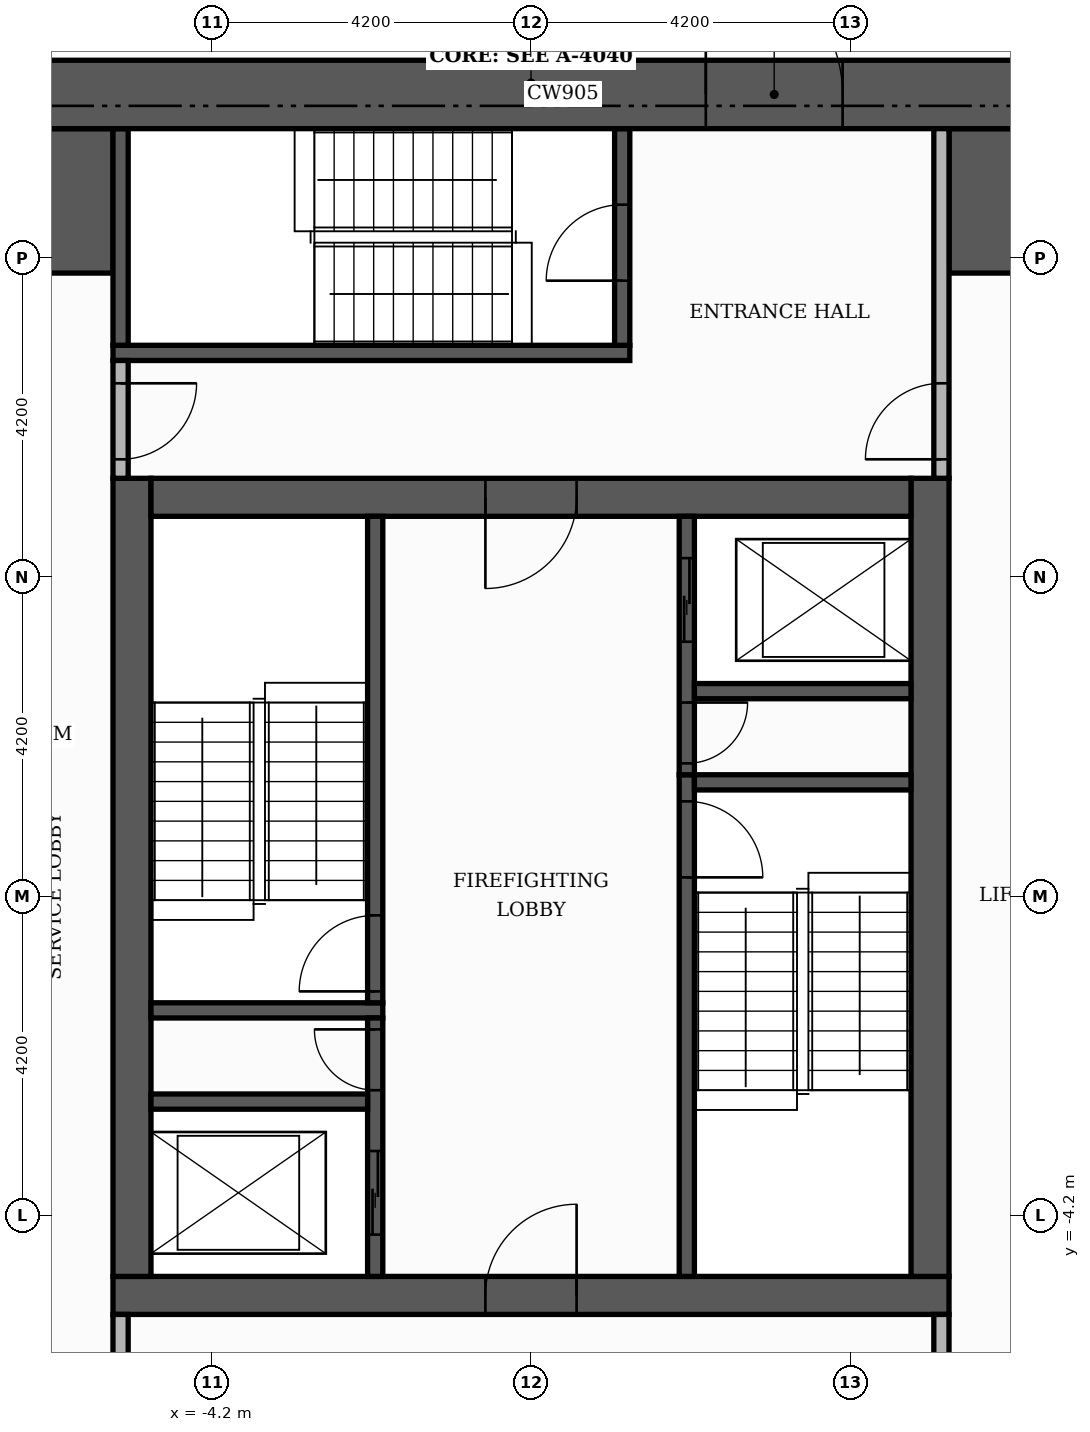
"""IFC4 building model, lengths in metres.
Left out: names, types, materials, properties, quantities, classifications, styles, units other than length and angle.
Written with IfcOpenShell. Run it as: python <this file> out.ifc"""

import sys

from ifc_helpers import new_model, si_unit, direction, frame, frame_2d, origin, place, context, subcontext, project, spatial, rectangle, extrude, element, fill, save


model = new_model("IFC4")
c1 = context("Model", 3, precision=1e-05, world=origin(), true_north=direction((0.0, 1.0)))
c2 = subcontext(c1, "Body", "Model", "MODEL_VIEW")
j1 = project(units=[si_unit("LENGTHUNIT", "METRE"), si_unit("PLANEANGLEUNIT", "RADIAN")], contexts=[c1])
p1 = place(None, origin())
s1 = spatial("IfcSite", under=j1, at=p1, CompositionType="ELEMENT")
p2 = place(p1, origin())
s2 = spatial("IfcBuilding", under=s1, at=p2, CompositionType="ELEMENT")
p3 = place(p2, frame((0.0, 0.0, 240.6)))
s3 = spatial("IfcBuildingStorey", under=s2, at=p3, CompositionType="ELEMENT", Elevation=240.6)
p4 = place(p3, frame((-5.5, -5.25, 0.0), z_axis=(0.0, 0.0, 1.0), x_axis=(1.0, 0.0, 0.0)))
e1 = element("IfcWall", 1, at=p4, inside=s3, PredefinedType="SHEAR", context=c2, shape_type="SweptSolid", body=[
    extrude(rectangle(XDim=11.0, YDim=0.5, at=frame_2d((5.5, 0.0))), origin(), (0.0, 0.0, 1.0), 3.48),
])
p5 = place(p4, frame((4.9, 0.0, 0.0)))
e2 = element("IfcOpeningElement", 2, at=p5, cuts=e1, PredefinedType="OPENING", context=c2, shape_type="SweptSolid", body=[
    extrude(rectangle(XDim=1.2, YDim=2.1, at=frame_2d((0.6, 1.05))), frame((0.0, 0.26, 0.0), z_axis=(0.0, -1.0, 0.0), x_axis=(1.0, 0.0, 0.0)), (0.0, 0.0, 1.0), 0.52),
])
for number, where, z_axis, x_axis in (
    (3, (-5.25, -5.0, 0.0), (0.0, 0.0, 1.0), (0.0, 1.0, 0.0)),
    (4, (5.25, -5.0, 0.0), (0.0, 0.0, 1.0), (0.0, 1.0, 0.0)),
):
    element("IfcWall", number, at=place(p3, frame(where, z_axis=z_axis, x_axis=x_axis)), inside=s3, PredefinedType="SHEAR", context=c2, shape_type="SweptSolid", body=[
        extrude(rectangle(XDim=10.5, YDim=0.5, at=frame_2d((5.25, 0.0))), origin(), (0.0, 0.0, 1.0), 3.48),
    ])
p6 = place(p3, frame((-5.0, 5.25, 0.0), z_axis=(0.0, 0.0, 1.0), x_axis=(1.0, 0.0, 0.0)))
e5 = element("IfcWall", 5, at=p6, inside=s3, PredefinedType="SHEAR", context=c2, shape_type="SweptSolid", body=[
    extrude(rectangle(XDim=10.0, YDim=0.5, at=frame_2d((5.0, 0.0))), origin(), (0.0, 0.0, 1.0), 3.48),
])
p7 = place(p6, frame((4.4, 0.0, 0.0)))
e6 = element("IfcOpeningElement", 6, at=p7, cuts=e5, PredefinedType="OPENING", context=c2, shape_type="SweptSolid", body=[
    extrude(rectangle(XDim=1.2, YDim=2.1, at=frame_2d((0.6, 1.05))), frame((0.0, 0.26, 0.0), z_axis=(0.0, -1.0, 0.0), x_axis=(1.0, 0.0, 0.0)), (0.0, 0.0, 1.0), 0.52),
])
for number, where, z_axis, x_axis in (
    (7, (-10.1, 9.15, 0.0), (0.0, 0.0, 1.0), (1.0, 0.0, 0.0)),
    (8, (5.5, 9.15, 0.0), (0.0, 0.0, 1.0), (1.0, 0.0, 0.0)),
):
    element("IfcWall", number, at=place(p3, frame(where, z_axis=z_axis, x_axis=x_axis)), inside=s3, PredefinedType="SHEAR", context=c2, shape_type="SweptSolid", body=[
        extrude(rectangle(XDim=4.6, YDim=1.9, at=frame_2d((2.3, 0.0))), origin(), (0.0, 0.0, 1.0), 3.48),
    ])
p8 = place(p3, frame((2.05, -5.0, 0.0), z_axis=(0.0, 0.0, 1.0), x_axis=(0.0, 1.0, 0.0)))
e9 = element("IfcWall", 9, at=p8, inside=s3, PredefinedType="SHEAR", context=c2, shape_type="SweptSolid", body=[
    extrude(rectangle(XDim=6.6, YDim=0.2, at=frame_2d((3.3, 0.0))), origin(), (0.0, 0.0, 1.0), 3.48),
])
p9 = place(p8, frame((5.25, 0.0, 0.0)))
e10 = element("IfcOpeningElement", 10, at=p9, cuts=e9, PredefinedType="OPENING", context=c2, shape_type="SweptSolid", body=[
    extrude(rectangle(XDim=1.0, YDim=2.1, at=frame_2d((0.5, 1.05))), frame((0.0, 0.11, 0.0), z_axis=(0.0, -1.0, 0.0), x_axis=(1.0, 0.0, 0.0)), (0.0, 0.0, 1.0), 0.22),
])
p10 = place(p3, frame((-5.0, -1.5, 0.0), z_axis=(0.0, 0.0, 1.0), x_axis=(1.0, 0.0, 0.0)))
e11 = element("IfcWall", 11, at=p10, inside=s3, PredefinedType="SHEAR", context=c2, shape_type="SweptSolid", body=[
    extrude(rectangle(XDim=3.05, YDim=0.2, at=frame_2d((1.525, 0.0))), origin(), (0.0, 0.0, 1.0), 3.48),
])
p11 = place(p3, frame((-2.05, -1.4, 0.0), z_axis=(0.0, 0.0, 1.0), x_axis=(0.0, 1.0, 0.0)))
e12 = element("IfcWall", 12, at=p11, inside=s3, PredefinedType="SHEAR", context=c2, shape_type="SweptSolid", body=[
    extrude(rectangle(XDim=6.4, YDim=0.2, at=frame_2d((3.2, 0.0))), origin(), (0.0, 0.0, 1.0), 3.48),
])
p12 = place(p11, frame((0.15, 0.0, 0.0)))
e13 = element("IfcOpeningElement", 13, at=p12, cuts=e12, PredefinedType="OPENING", context=c2, shape_type="SweptSolid", body=[
    extrude(rectangle(XDim=1.0, YDim=2.1, at=frame_2d((0.5, 1.05))), frame((0.0, 0.11, 0.0), z_axis=(0.0, -1.0, 0.0), x_axis=(1.0, 0.0, 0.0)), (0.0, 0.0, 1.0), 0.22),
])
p13 = place(p3, frame((2.15, 1.5, 0.0), z_axis=(0.0, 0.0, 1.0), x_axis=(1.0, 0.0, 0.0)))
e14 = element("IfcWall", 14, at=p13, inside=s3, PredefinedType="SHEAR", context=c2, shape_type="SweptSolid", body=[
    extrude(rectangle(XDim=2.85, YDim=0.2, at=frame_2d((1.425, 0.0))), origin(), (0.0, 0.0, 1.0), 3.48),
])
p14 = place(p3, frame((-5.5, 7.15, 0.0), z_axis=(0.0, 0.0, 1.0), x_axis=(1.0, 0.0, 0.0)))
e15 = element("IfcWall", 15, at=p14, inside=s3, PredefinedType="SHEAR", context=c2, shape_type="SweptSolid", body=[
    extrude(rectangle(XDim=6.8, YDim=0.2, at=frame_2d((3.4, 0.0))), origin(), (0.0, 0.0, 1.0), 3.48),
])
p15 = place(p3, frame((-5.4, 7.25, 0.0), z_axis=(0.0, 0.0, 1.0), x_axis=(0.0, 1.0, 0.0)))
e16 = element("IfcWall", 16, at=p15, inside=s3, PredefinedType="SHEAR", context=c2, shape_type="SweptSolid", body=[
    extrude(rectangle(XDim=2.85, YDim=0.2, at=frame_2d((1.425, 0.0))), origin(), (0.0, 0.0, 1.0), 3.48),
])
p16 = place(p3, frame((1.2, 7.25, 0.0), z_axis=(0.0, 0.0, 1.0), x_axis=(0.0, 1.0, 0.0)))
e17 = element("IfcWall", 17, at=p16, inside=s3, PredefinedType="SHEAR", context=c2, shape_type="SweptSolid", body=[
    extrude(rectangle(XDim=2.85, YDim=0.2, at=frame_2d((1.425, 0.0))), origin(), (0.0, 0.0, 1.0), 3.48),
])
p17 = place(p16, frame((0.85, 0.0, 0.0)))
e18 = element("IfcOpeningElement", 18, at=p17, cuts=e17, PredefinedType="OPENING", context=c2, shape_type="SweptSolid", body=[
    extrude(rectangle(XDim=1.0, YDim=2.1, at=frame_2d((0.5, 1.05))), frame((0.0, 0.11, 0.0), z_axis=(0.0, -1.0, 0.0), x_axis=(1.0, 0.0, 0.0)), (0.0, 0.0, 1.0), 0.22),
])
p18 = place(p3, frame((-2.05, -5.0, 0.0), z_axis=(0.0, 0.0, 1.0), x_axis=(0.0, 1.0, 0.0)))
e19 = element("IfcWall", 19, at=p18, inside=s3, PredefinedType="SHEAR", context=c2, shape_type="SweptSolid", body=[
    extrude(rectangle(XDim=3.4, YDim=0.2, at=frame_2d((1.7, 0.0))), origin(), (0.0, 0.0, 1.0), 3.48),
])
p19 = place(p18, frame((0.55, 0.0, 0.0)))
e20 = element("IfcOpeningElement", 20, at=p19, cuts=e19, PredefinedType="OPENING", context=c2, shape_type="SweptSolid", body=[
    extrude(rectangle(XDim=1.1, YDim=2.1, at=frame_2d((0.55, 1.05))), frame((0.0, 0.11, 0.0), z_axis=(0.0, -1.0, 0.0), x_axis=(1.0, 0.0, 0.0)), (0.0, 0.0, 1.0), 0.22),
])
p20 = place(p18, frame((2.45, 0.0, 0.0)))
e21 = element("IfcOpeningElement", 21, at=p20, cuts=e19, PredefinedType="OPENING", context=c2, shape_type="SweptSolid", body=[
    extrude(rectangle(XDim=0.8, YDim=2.1, at=frame_2d((0.4, 1.05))), frame((0.0, 0.11, 0.0), z_axis=(0.0, -1.0, 0.0), x_axis=(1.0, 0.0, 0.0)), (0.0, 0.0, 1.0), 0.22),
])
p21 = place(p3, frame((-5.0, -2.7, 0.0), z_axis=(0.0, 0.0, 1.0), x_axis=(1.0, 0.0, 0.0)))
e22 = element("IfcWall", 22, at=p21, inside=s3, PredefinedType="SHEAR", context=c2, shape_type="SweptSolid", body=[
    extrude(rectangle(XDim=2.85, YDim=0.2, at=frame_2d((1.425, 0.0))), origin(), (0.0, 0.0, 1.0), 3.48),
])
p22 = place(p3, frame((2.05, 1.6, 0.0), z_axis=(0.0, 0.0, 1.0), x_axis=(0.0, 1.0, 0.0)))
e23 = element("IfcWall", 23, at=p22, inside=s3, PredefinedType="SHEAR", context=c2, shape_type="SweptSolid", body=[
    extrude(rectangle(XDim=3.4, YDim=0.2, at=frame_2d((1.7, 0.0))), origin(), (0.0, 0.0, 1.0), 3.48),
])
p23 = place(p22, frame((1.75, 0.0, 0.0)))
e24 = element("IfcOpeningElement", 24, at=p23, cuts=e23, PredefinedType="OPENING", context=c2, shape_type="SweptSolid", body=[
    extrude(rectangle(XDim=1.1, YDim=2.1, at=frame_2d((0.55, 1.05))), frame((0.0, 0.11, 0.0), z_axis=(0.0, -1.0, 0.0), x_axis=(1.0, 0.0, 0.0)), (0.0, 0.0, 1.0), 0.22),
])
p24 = place(p22, frame((0.15, 0.0, 0.0)))
e25 = element("IfcOpeningElement", 25, at=p24, cuts=e23, PredefinedType="OPENING", context=c2, shape_type="SweptSolid", body=[
    extrude(rectangle(XDim=0.8, YDim=2.1, at=frame_2d((0.4, 1.05))), frame((0.0, 0.11, 0.0), z_axis=(0.0, -1.0, 0.0), x_axis=(1.0, 0.0, 0.0)), (0.0, 0.0, 1.0), 0.22),
])
p25 = place(p3, frame((2.15, 2.7, 0.0), z_axis=(0.0, 0.0, 1.0), x_axis=(1.0, 0.0, 0.0)))
e26 = element("IfcWall", 26, at=p25, inside=s3, PredefinedType="SHEAR", context=c2, shape_type="SweptSolid", body=[
    extrude(rectangle(XDim=2.85, YDim=0.2, at=frame_2d((1.425, 0.0))), origin(), (0.0, 0.0, 1.0), 3.48),
])
p26 = place(p3, frame((-11.0, 10.55, 0.0), z_axis=(0.0, 0.0, 1.0), x_axis=(1.0, 0.0, 0.0)))
e27 = element("IfcWall", 27, at=p26, inside=s3, PredefinedType="SHEAR", context=c2, shape_type="SweptSolid", body=[
    extrude(rectangle(XDim=22.0, YDim=0.9, at=frame_2d((11.0, 0.0))), origin(), (0.0, 0.0, 1.0), 3.48),
])
p27 = place(p26, frame((13.3, 0.0, 0.0)))
e28 = element("IfcOpeningElement", 28, at=p27, cuts=e27, PredefinedType="OPENING", context=c2, shape_type="SweptSolid", body=[
    extrude(rectangle(XDim=1.8, YDim=2.2, at=frame_2d((0.9, 1.1))), frame((0.0, 0.46, 0.0), z_axis=(0.0, -1.0, 0.0), x_axis=(1.0, 0.0, 0.0)), (0.0, 0.0, 1.0), 0.92),
])
p28 = place(p3, frame((-5.4, -10.1, 0.0), z_axis=(0.0, 0.0, 1.0), x_axis=(0.0, 1.0, 0.0)))
e29 = element("IfcWall", 29, at=p28, inside=s3, PredefinedType="PARTITIONING", context=c2, shape_type="SweptSolid", body=[
    extrude(rectangle(XDim=4.6, YDim=0.2, at=frame_2d((2.3, 0.0))), origin(), (0.0, 0.0, 1.0), 3.48),
])
p29 = place(p28, frame((2.9, 0.0, 0.0)))
e30 = element("IfcOpeningElement", 30, at=p29, cuts=e29, PredefinedType="OPENING", context=c2, shape_type="SweptSolid", body=[
    extrude(rectangle(XDim=1.0, YDim=2.1, at=frame_2d((0.5, 1.05))), frame((0.0, 0.11, 0.0), z_axis=(0.0, -1.0, 0.0), x_axis=(1.0, 0.0, 0.0)), (0.0, 0.0, 1.0), 0.22),
])
p30 = place(p3, frame((5.4, -10.1, 0.0), z_axis=(0.0, 0.0, 1.0), x_axis=(0.0, 1.0, 0.0)))
e31 = element("IfcWall", 31, at=p30, inside=s3, PredefinedType="PARTITIONING", context=c2, shape_type="SweptSolid", body=[
    extrude(rectangle(XDim=4.6, YDim=0.2, at=frame_2d((2.3, 0.0))), origin(), (0.0, 0.0, 1.0), 3.48),
])
p31 = place(p30, frame((2.9, 0.0, 0.0)))
e32 = element("IfcOpeningElement", 32, at=p31, cuts=e31, PredefinedType="OPENING", context=c2, shape_type="SweptSolid", body=[
    extrude(rectangle(XDim=1.0, YDim=2.1, at=frame_2d((0.5, 1.05))), frame((0.0, 0.11, 0.0), z_axis=(0.0, -1.0, 0.0), x_axis=(1.0, 0.0, 0.0)), (0.0, 0.0, 1.0), 0.22),
])
p32 = place(p3, frame((-5.4, 5.5, 0.0), z_axis=(0.0, 0.0, 1.0), x_axis=(0.0, 1.0, 0.0)))
e33 = element("IfcWall", 33, at=p32, inside=s3, PredefinedType="PARTITIONING", context=c2, shape_type="SweptSolid", body=[
    extrude(rectangle(XDim=1.55, YDim=0.2, at=frame_2d((0.775, 0.0))), origin(), (0.0, 0.0, 1.0), 3.48),
])
p33 = place(p32, frame((0.25, 0.0, 0.0)))
e34 = element("IfcOpeningElement", 34, at=p33, cuts=e33, PredefinedType="OPENING", context=c2, shape_type="SweptSolid", body=[
    extrude(rectangle(XDim=1.0, YDim=2.1, at=frame_2d((0.5, 1.05))), frame((0.0, 0.11, 0.0), z_axis=(0.0, -1.0, 0.0), x_axis=(1.0, 0.0, 0.0)), (0.0, 0.0, 1.0), 0.22),
])
p34 = place(p3, frame((5.4, 5.5, 0.0), z_axis=(0.0, 0.0, 1.0), x_axis=(0.0, 1.0, 0.0)))
e35 = element("IfcWall", 35, at=p34, inside=s3, PredefinedType="PARTITIONING", context=c2, shape_type="SweptSolid", body=[
    extrude(rectangle(XDim=4.6, YDim=0.2, at=frame_2d((2.3, 0.0))), origin(), (0.0, 0.0, 1.0), 3.48),
])
p35 = place(p34, frame((0.25, 0.0, 0.0)))
e36 = element("IfcOpeningElement", 36, at=p35, cuts=e35, PredefinedType="OPENING", context=c2, shape_type="SweptSolid", body=[
    extrude(rectangle(XDim=1.0, YDim=2.1, at=frame_2d((0.5, 1.05))), frame((0.0, 0.11, 0.0), z_axis=(0.0, -1.0, 0.0), x_axis=(1.0, 0.0, 0.0)), (0.0, 0.0, 1.0), 0.22),
])
p36 = place(p23, origin())
e37 = element("IfcDoor", 37, at=p36, inside=s3, OperationType="SLIDING_TO_LEFT", PredefinedType="DOOR", context=c2, shape_type="SweptSolid", body=[
    extrude(rectangle(XDim=1.1, YDim=2.1, at=frame_2d((0.55, 1.05))), frame((0.0, 0.025, 0.0), z_axis=(0.0, -1.0, 0.0), x_axis=(1.0, 0.0, 0.0)), (0.0, 0.0, 1.0), 0.05),
])
fill(e24, e37)
p37 = place(p19, origin())
e38 = element("IfcDoor", 38, at=p37, inside=s3, OperationType="SLIDING_TO_LEFT", PredefinedType="DOOR", context=c2, shape_type="SweptSolid", body=[
    extrude(rectangle(XDim=1.1, YDim=2.1, at=frame_2d((0.55, 1.05))), frame((0.0, 0.025, 0.0), z_axis=(0.0, -1.0, 0.0), x_axis=(1.0, 0.0, 0.0)), (0.0, 0.0, 1.0), 0.05),
])
fill(e20, e38)
p38 = place(p12, origin())
e39 = element("IfcDoor", 39, at=p38, inside=s3, OperationType="SINGLE_SWING_LEFT", PredefinedType="DOOR", context=c2, shape_type="SweptSolid", body=[
    extrude(rectangle(XDim=1.0, YDim=2.1, at=frame_2d((0.5, 1.05))), frame((0.0, 0.025, 0.0), z_axis=(0.0, -1.0, 0.0), x_axis=(1.0, 0.0, 0.0)), (0.0, 0.0, 1.0), 0.05),
])
fill(e13, e39)
p39 = place(p9, frame((1.0, 0.0, 0.0), z_axis=(0.0, 0.0, 1.0), x_axis=(-1.0, 0.0, 0.0)))
e40 = element("IfcDoor", 40, at=p39, inside=s3, OperationType="SINGLE_SWING_LEFT", PredefinedType="DOOR", context=c2, shape_type="SweptSolid", body=[
    extrude(rectangle(XDim=1.0, YDim=2.1, at=frame_2d((0.5, 1.05))), frame((0.0, 0.025, 0.0), z_axis=(0.0, -1.0, 0.0), x_axis=(1.0, 0.0, 0.0)), (0.0, 0.0, 1.0), 0.05),
])
fill(e10, e40)
p40 = place(p24, frame((0.8, 0.0, 0.0), z_axis=(0.0, 0.0, 1.0), x_axis=(-1.0, 0.0, 0.0)))
e41 = element("IfcDoor", 41, at=p40, inside=s3, OperationType="SINGLE_SWING_RIGHT", PredefinedType="DOOR", context=c2, shape_type="SweptSolid", body=[
    extrude(rectangle(XDim=0.8, YDim=2.1, at=frame_2d((0.4, 1.05))), frame((0.0, 0.025, 0.0), z_axis=(0.0, -1.0, 0.0), x_axis=(1.0, 0.0, 0.0)), (0.0, 0.0, 1.0), 0.05),
])
fill(e25, e41)
p41 = place(p20, origin())
e42 = element("IfcDoor", 42, at=p41, inside=s3, OperationType="SINGLE_SWING_RIGHT", PredefinedType="DOOR", context=c2, shape_type="SweptSolid", body=[
    extrude(rectangle(XDim=0.8, YDim=2.1, at=frame_2d((0.4, 1.05))), frame((0.0, 0.025, 0.0), z_axis=(0.0, -1.0, 0.0), x_axis=(1.0, 0.0, 0.0)), (0.0, 0.0, 1.0), 0.05),
])
fill(e21, e42)
p42 = place(p7, frame((1.2, 0.0, 0.0), z_axis=(0.0, 0.0, 1.0), x_axis=(-1.0, 0.0, 0.0)))
e43 = element("IfcDoor", 43, at=p42, inside=s3, OperationType="SINGLE_SWING_LEFT", PredefinedType="DOOR", context=c2, shape_type="SweptSolid", body=[
    extrude(rectangle(XDim=1.2, YDim=2.1, at=frame_2d((0.6, 1.05))), frame((0.0, 0.025, 0.0), z_axis=(0.0, -1.0, 0.0), x_axis=(1.0, 0.0, 0.0)), (0.0, 0.0, 1.0), 0.05),
])
fill(e6, e43)
p43 = place(p5, origin())
e44 = element("IfcDoor", 44, at=p43, inside=s3, OperationType="SINGLE_SWING_RIGHT", PredefinedType="DOOR", context=c2, shape_type="SweptSolid", body=[
    extrude(rectangle(XDim=1.2, YDim=2.1, at=frame_2d((0.6, 1.05))), frame((0.0, 0.025, 0.0), z_axis=(0.0, -1.0, 0.0), x_axis=(1.0, 0.0, 0.0)), (0.0, 0.0, 1.0), 0.05),
])
fill(e2, e44)
p44 = place(p17, origin())
e45 = element("IfcDoor", 45, at=p44, inside=s3, OperationType="SINGLE_SWING_LEFT", PredefinedType="DOOR", context=c2, shape_type="SweptSolid", body=[
    extrude(rectangle(XDim=1.0, YDim=2.1, at=frame_2d((0.5, 1.05))), frame((0.0, 0.025, 0.0), z_axis=(0.0, -1.0, 0.0), x_axis=(1.0, 0.0, 0.0)), (0.0, 0.0, 1.0), 0.05),
])
fill(e18, e45)
p45 = place(p33, frame((1.0, 0.0, 0.0), z_axis=(0.0, 0.0, 1.0), x_axis=(-1.0, 0.0, 0.0)))
e46 = element("IfcDoor", 46, at=p45, inside=s3, OperationType="SINGLE_SWING_RIGHT", PredefinedType="DOOR", context=c2, shape_type="SweptSolid", body=[
    extrude(rectangle(XDim=1.0, YDim=2.1, at=frame_2d((0.5, 1.05))), frame((0.0, 0.025, 0.0), z_axis=(0.0, -1.0, 0.0), x_axis=(1.0, 0.0, 0.0)), (0.0, 0.0, 1.0), 0.05),
])
fill(e34, e46)
p46 = place(p35, origin())
e47 = element("IfcDoor", 47, at=p46, inside=s3, OperationType="SINGLE_SWING_LEFT", PredefinedType="DOOR", context=c2, shape_type="SweptSolid", body=[
    extrude(rectangle(XDim=1.0, YDim=2.1, at=frame_2d((0.5, 1.05))), frame((0.0, 0.025, 0.0), z_axis=(0.0, -1.0, 0.0), x_axis=(1.0, 0.0, 0.0)), (0.0, 0.0, 1.0), 0.05),
])
fill(e36, e47)
p47 = place(p27, origin())
e48 = element("IfcDoor", 48, at=p47, inside=s3, OperationType="DOUBLE_DOOR_SINGLE_SWING", PredefinedType="DOOR", context=c2, shape_type="SweptSolid", body=[
    extrude(rectangle(XDim=1.8, YDim=2.2, at=frame_2d((0.9, 1.1))), frame((0.0, 0.025, 0.0), z_axis=(0.0, -1.0, 0.0), x_axis=(1.0, 0.0, 0.0)), (0.0, 0.0, 1.0), 0.05),
])
fill(e28, e48)
save(model, sys.argv[1])
